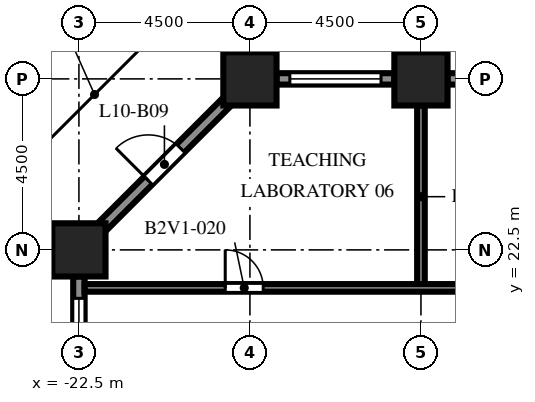
"""IFC4 building model, lengths in metres.
Left out: names, types, materials, properties, quantities, classifications, styles, units other than length and angle.
Written with IfcOpenShell. Run it as: python <this file> out.ifc"""

import sys

from ifc_helpers import new_model, si_unit, direction, frame, frame_2d, origin, origin_2d, place, context, subcontext, project, spatial, rectangle, extrude, element, fill, save


model = new_model("IFC4")
c1 = context("Model", 3, precision=1e-05, world=origin(), true_north=direction((0.0, 1.0)))
c2 = subcontext(c1, "Body", "Model", "MODEL_VIEW")
j1 = project(units=[si_unit("LENGTHUNIT", "METRE"), si_unit("PLANEANGLEUNIT", "RADIAN")], contexts=[c1])
p1 = place(None, origin())
s1 = spatial("IfcSite", under=j1, at=p1, CompositionType="ELEMENT")
p2 = place(p1, origin())
s2 = spatial("IfcBuilding", under=s1, at=p2, CompositionType="ELEMENT")
p3 = place(p2, frame((0.0, 0.0, 46.0)))
s3 = spatial("IfcBuildingStorey", under=s2, at=p3, CompositionType="ELEMENT", Elevation=46.0)
for number, where, z_axis, x_axis in (
    (1, (-22.5, 22.5, 0.0), (0.0, 0.0, 1.0), (1.0, 0.0, 0.0)),
    (2, (-18.0, 27.0, 0.0), (0.0, 0.0, 1.0), (1.0, 0.0, 0.0)),
    (3, (-13.5, 27.0, 0.0), (0.0, 0.0, 1.0), (1.0, 0.0, 0.0)),
):
    element("IfcColumn", number, at=place(p3, frame(where, z_axis=z_axis, x_axis=x_axis)), inside=s3, PredefinedType="COLUMN", context=c2, shape_type="SweptSolid", body=[
        extrude(rectangle(XDim=1.4, YDim=1.4, at=origin_2d()), origin(), (0.0, 0.0, 1.0), 4.1),
    ])
p4 = place(p3, frame((-12.8, 27.0, 0.0), z_axis=(0.0, 0.0, 1.0), x_axis=(1.0, 0.0, 0.0)))
e4 = element("IfcWall", 4, at=p4, inside=s3, PredefinedType="SOLIDWALL", context=c2, shape_type="SweptSolid", body=[
    extrude(rectangle(XDim=3.1, YDim=0.3, at=frame_2d((1.55, 0.0))), origin(), (0.0, 0.0, 1.0), 2.75),
])
p5 = place(p4, frame((1.05, 0.0, 0.0)))
e5 = element("IfcOpeningElement", 5, at=p5, cuts=e4, PredefinedType="OPENING", context=c2, shape_type="SweptSolid", body=[
    extrude(rectangle(XDim=1.0, YDim=2.2, at=frame_2d((0.5, 1.1))), frame((0.0, 0.16, 0.0), z_axis=(0.0, -1.0, 0.0), x_axis=(1.0, 0.0, 0.0)), (0.0, 0.0, 1.0), 0.32),
])
p6 = place(p3, frame((-17.3, 27.0, 0.0), z_axis=(0.0, 0.0, 1.0), x_axis=(1.0, 0.0, 0.0)))
e6 = element("IfcWall", 6, at=p6, inside=s3, PredefinedType="SOLIDWALL", context=c2, shape_type="SweptSolid", body=[
    extrude(rectangle(XDim=3.1, YDim=0.3, at=frame_2d((1.55, 0.0))), origin(), (0.0, 0.0, 1.0), 2.75),
])
p7 = place(p6, frame((0.35, 0.0, 0.8)))
e7 = element("IfcOpeningElement", 7, at=p7, cuts=e6, PredefinedType="OPENING", context=c2, shape_type="SweptSolid", body=[
    extrude(rectangle(XDim=2.4, YDim=1.7, at=frame_2d((1.2, 0.85))), frame((0.0, 0.16, 0.0), z_axis=(0.0, -1.0, 0.0), x_axis=(1.0, 0.0, 0.0)), (0.0, 0.0, 1.0), 0.32),
])
p8 = place(p3, frame((-21.906, 23.094, 0.0), z_axis=(0.0, 0.0, 1.0), x_axis=(0.707106781187, 0.707106781187, 0.0)))
e8 = element("IfcWall", 8, at=p8, inside=s3, PredefinedType="SOLIDWALL", context=c2, shape_type="SweptSolid", body=[
    extrude(rectangle(XDim=4.684, YDim=0.3, at=frame_2d((2.342, 0.0))), origin(), (0.0, 0.0, 1.0), 2.75),
])
p9 = place(p8, frame((1.742, 0.0, 0.0)))
e9 = element("IfcOpeningElement", 9, at=p9, cuts=e8, PredefinedType="OPENING", context=c2, shape_type="SweptSolid", body=[
    extrude(rectangle(XDim=1.2, YDim=2.2, at=frame_2d((0.6, 1.1))), frame((0.0, 0.16, 0.0), z_axis=(0.0, -1.0, 0.0), x_axis=(1.0, 0.0, 0.0)), (0.0, 0.0, 1.0), 0.32),
])
p10 = place(p3, frame((-22.5, 18.7, 0.0), z_axis=(0.0, 0.0, 1.0), x_axis=(0.0, 1.0, 0.0)))
e10 = element("IfcWall", 10, at=p10, inside=s3, PredefinedType="SOLIDWALL", context=c2, shape_type="SweptSolid", body=[
    extrude(rectangle(XDim=3.1, YDim=0.3, at=frame_2d((1.55, 0.0))), origin(), (0.0, 0.0, 1.0), 2.75),
])
p11 = place(p10, frame((0.125, 0.0, 0.8)))
e11 = element("IfcOpeningElement", 11, at=p11, cuts=e10, PredefinedType="OPENING", context=c2, shape_type="SweptSolid", body=[
    extrude(rectangle(XDim=2.4, YDim=1.7, at=frame_2d((1.2, 0.85))), frame((0.0, 0.16, 0.0), z_axis=(0.0, -1.0, 0.0), x_axis=(1.0, 0.0, 0.0)), (0.0, 0.0, 1.0), 0.32),
])
p12 = place(p3, frame((-13.5, 21.5, 0.0), z_axis=(0.0, 0.0, 1.0), x_axis=(0.0, 1.0, 0.0)))
e12 = element("IfcWall", 12, at=p12, inside=s3, PredefinedType="PARTITIONING", context=c2, shape_type="SweptSolid", body=[
    extrude(rectangle(XDim=4.8, YDim=0.2, at=frame_2d((2.4, 0.0))), origin(), (0.0, 0.0, 1.0), 3.65),
])
p13 = place(p3, frame((-22.35, 21.5, 0.0), z_axis=(0.0, 0.0, 1.0), x_axis=(1.0, 0.0, 0.0)))
e13 = element("IfcWall", 13, at=p13, inside=s3, PredefinedType="PARTITIONING", context=c2, shape_type="SweptSolid", body=[
    extrude(rectangle(XDim=53.7, YDim=0.2, at=frame_2d((26.85, 0.0))), origin(), (0.0, 0.0, 1.0), 3.65),
])
p14 = place(p13, frame((3.7, 0.0, 0.0)))
e14 = element("IfcOpeningElement", 14, at=p14, cuts=e13, PredefinedType="OPENING", context=c2, shape_type="SweptSolid", body=[
    extrude(rectangle(XDim=1.0, YDim=2.1, at=frame_2d((0.5, 1.05))), frame((0.0, 0.11, 0.0), z_axis=(0.0, -1.0, 0.0), x_axis=(1.0, 0.0, 0.0)), (0.0, 0.0, 1.0), 0.22),
])
p15 = place(p13, frame((14.2, 0.0, 0.0)))
e15 = element("IfcOpeningElement", 15, at=p15, cuts=e13, PredefinedType="OPENING", context=c2, shape_type="SweptSolid", body=[
    extrude(rectangle(XDim=1.0, YDim=2.1, at=frame_2d((0.5, 1.05))), frame((0.0, 0.11, 0.0), z_axis=(0.0, -1.0, 0.0), x_axis=(1.0, 0.0, 0.0)), (0.0, 0.0, 1.0), 0.22),
])
p16 = place(p13, frame((29.45, 0.0, 0.0)))
e16 = element("IfcOpeningElement", 16, at=p16, cuts=e13, PredefinedType="OPENING", context=c2, shape_type="SweptSolid", body=[
    extrude(rectangle(XDim=1.0, YDim=2.1, at=frame_2d((0.5, 1.05))), frame((0.0, 0.11, 0.0), z_axis=(0.0, -1.0, 0.0), x_axis=(1.0, 0.0, 0.0)), (0.0, 0.0, 1.0), 0.22),
])
p17 = place(p13, frame((41.2, 0.0, 0.0)))
e17 = element("IfcOpeningElement", 17, at=p17, cuts=e13, PredefinedType="OPENING", context=c2, shape_type="SweptSolid", body=[
    extrude(rectangle(XDim=1.0, YDim=2.1, at=frame_2d((0.5, 1.05))), frame((0.0, 0.11, 0.0), z_axis=(0.0, -1.0, 0.0), x_axis=(1.0, 0.0, 0.0)), (0.0, 0.0, 1.0), 0.22),
])
p18 = place(p13, frame((48.95, 0.0, 0.0)))
e18 = element("IfcOpeningElement", 18, at=p18, cuts=e13, PredefinedType="OPENING", context=c2, shape_type="SweptSolid", body=[
    extrude(rectangle(XDim=1.0, YDim=2.1, at=frame_2d((0.5, 1.05))), frame((0.0, 0.11, 0.0), z_axis=(0.0, -1.0, 0.0), x_axis=(1.0, 0.0, 0.0)), (0.0, 0.0, 1.0), 0.22),
])
p19 = place(p7, origin())
e19 = element("IfcWindow", 19, at=p19, inside=s3, PartitioningType="SINGLE_PANEL", PredefinedType="WINDOW", context=c2, shape_type="SweptSolid", body=[
    extrude(rectangle(XDim=2.4, YDim=1.7, at=frame_2d((1.2, 0.85))), frame((0.0, 0.03, 0.0), z_axis=(0.0, -1.0, 0.0), x_axis=(1.0, 0.0, 0.0)), (0.0, 0.0, 1.0), 0.06),
])
fill(e7, e19)
p20 = place(p9, origin())
e20 = element("IfcDoor", 20, at=p20, inside=s3, OperationType="SINGLE_SWING_LEFT", PredefinedType="DOOR", context=c2, shape_type="SweptSolid", body=[
    extrude(rectangle(XDim=1.2, YDim=2.2, at=frame_2d((0.6, 1.1))), frame((0.0, 0.025, 0.0), z_axis=(0.0, -1.0, 0.0), x_axis=(1.0, 0.0, 0.0)), (0.0, 0.0, 1.0), 0.05),
])
fill(e9, e20)
p21 = place(p11, origin())
e21 = element("IfcWindow", 21, at=p21, inside=s3, PartitioningType="SINGLE_PANEL", PredefinedType="WINDOW", context=c2, shape_type="SweptSolid", body=[
    extrude(rectangle(XDim=2.4, YDim=1.7, at=frame_2d((1.2, 0.85))), frame((0.0, 0.03, 0.0), z_axis=(0.0, -1.0, 0.0), x_axis=(1.0, 0.0, 0.0)), (0.0, 0.0, 1.0), 0.06),
])
fill(e11, e21)
p22 = place(p14, origin())
e22 = element("IfcDoor", 22, at=p22, inside=s3, OperationType="SINGLE_SWING_LEFT", PredefinedType="DOOR", context=c2, shape_type="SweptSolid", body=[
    extrude(rectangle(XDim=1.0, YDim=2.1, at=frame_2d((0.5, 1.05))), frame((0.0, 0.025, 0.0), z_axis=(0.0, -1.0, 0.0), x_axis=(1.0, 0.0, 0.0)), (0.0, 0.0, 1.0), 0.05),
])
fill(e14, e22)
save(model, sys.argv[1])
